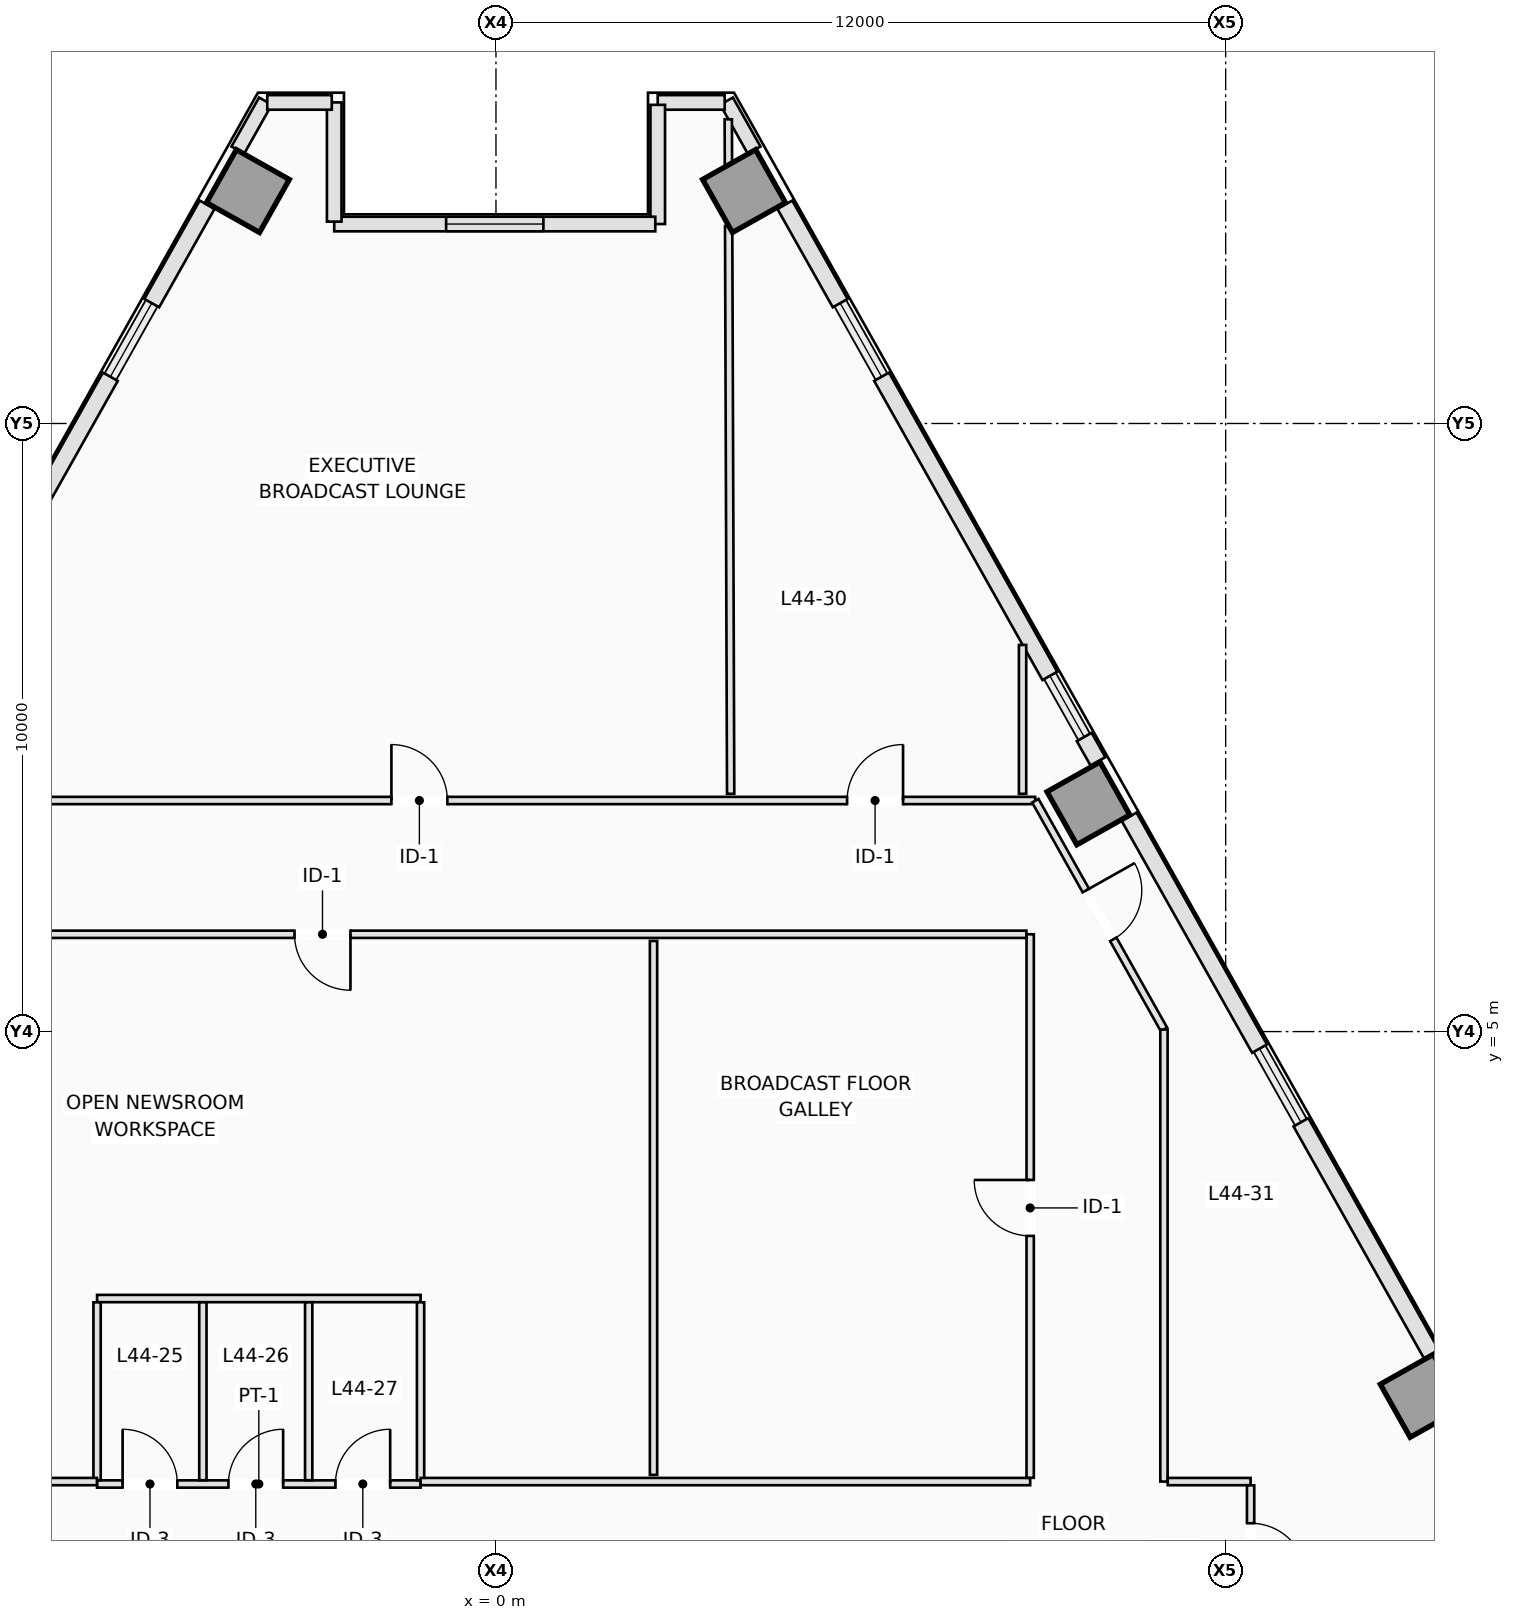
"""IFC4 building model, lengths in metres.
Left out: names, types, materials, properties, quantities, classifications, styles, units other than length and angle.
Written with IfcOpenShell. Run it as: python <this file> out.ifc"""

import sys

from ifc_helpers import new_model, si_unit, direction, frame, frame_2d, origin, origin_2d, place, context, subcontext, project, spatial, rectangle, extrude, element, fill, save


model = new_model("IFC4")
c1 = context("Model", 3, precision=1e-05, world=origin(), true_north=direction((0.0, 1.0)))
c2 = subcontext(c1, "Body", "Model", "MODEL_VIEW")
j1 = project(units=[si_unit("LENGTHUNIT", "METRE"), si_unit("PLANEANGLEUNIT", "RADIAN")], contexts=[c1])
p1 = place(None, origin())
s1 = spatial("IfcSite", under=j1, at=p1, CompositionType="ELEMENT")
p2 = place(p1, origin())
s2 = spatial("IfcBuilding", under=s1, at=p2, CompositionType="ELEMENT")
p3 = place(p2, frame((0.0, 0.0, 161.5)))
s3 = spatial("IfcBuildingStorey", under=s2, at=p3, CompositionType="ELEMENT", Elevation=161.5)
for number, where, z_axis, x_axis in (
    (1, (15.224, -0.991, 0.0), (0.0, 0.0, 1.0), (0.872, 0.49, 0.0)),
    (2, (9.743, 8.753, 0.0), (0.0, 0.0, 1.0), (0.872, 0.49, 0.0)),
    (3, (4.079, 18.822, 0.0), (0.0, 0.0, 1.0), (0.872, 0.49, 0.0)),
    (4, (-4.079, 18.822, 0.0), (0.0, 0.0, 1.0), (-0.872, 0.49, 0.0)),
):
    element("IfcColumn", number, at=place(p3, frame(where, z_axis=z_axis, x_axis=x_axis)), inside=s3, PredefinedType="COLUMN", context=c2, shape_type="SweptSolid", body=[
        extrude(rectangle(XDim=1.0, YDim=1.0, at=origin_2d()), origin(), (0.0, 0.0, 1.0), 3.5),
    ])
p4 = place(p3, frame((3.792, 20.302, 0.0), z_axis=(0.0, 0.0, 1.0), x_axis=(0.490048346303, -0.871695255399, 0.0)))
e5 = element("IfcWall", 5, at=p4, inside=s3, PredefinedType="STANDARD", context=c2, shape_type="SweptSolid", body=[
    extrude(rectangle(XDim=0.926, YDim=0.24, at=frame_2d((0.463, 0.0))), origin(), (0.0, 0.0, 1.0), 3.25),
])
p5 = place(p3, frame((4.751, 18.597, 0.0), z_axis=(0.0, 0.0, 1.0), x_axis=(0.490248749158, -0.871582562899, 0.0)))
e6 = element("IfcWall", 6, at=p5, inside=s3, PredefinedType="STANDARD", context=c2, shape_type="SweptSolid", body=[
    extrude(rectangle(XDim=1.856, YDim=0.28, at=frame_2d((0.928, 0.0))), origin(), (0.0, 0.0, 1.0), 3.25),
])
p6 = place(p3, frame((6.342, 15.768, 0.0), z_axis=(0.0, 0.0, 1.0), x_axis=(0.490289995219, -0.871559361483, 0.0)))
e7 = element("IfcWall", 7, at=p6, inside=s3, PredefinedType="STANDARD", context=c2, shape_type="SweptSolid", body=[
    extrude(rectangle(XDim=5.643, YDim=0.28, at=frame_2d((2.822, 0.0))), origin(), (0.0, 0.0, 1.0), 3.25),
])
p7 = place(p3, frame((9.674, 9.845, 0.0), z_axis=(0.0, 0.0, 1.0), x_axis=(0.490412424957, -0.871490478116, 0.0)))
e8 = element("IfcWall", 8, at=p7, inside=s3, PredefinedType="STANDARD", context=c2, shape_type="SweptSolid", body=[
    extrude(rectangle(XDim=0.46, YDim=0.28, at=frame_2d((0.23, 0.0))), origin(), (0.0, 0.0, 1.0), 3.25),
])
p8 = place(p3, frame((10.412, 8.533, 0.0), z_axis=(0.0, 0.0, 1.0), x_axis=(0.490274486291, -0.871568085747, 0.0)))
e9 = element("IfcWall", 9, at=p8, inside=s3, PredefinedType="STANDARD", context=c2, shape_type="SweptSolid", body=[
    extrude(rectangle(XDim=4.375, YDim=0.28, at=frame_2d((2.188, 0.0))), origin(), (0.0, 0.0, 1.0), 3.25),
])
p9 = place(p3, frame((13.238, 3.509, 0.0), z_axis=(0.0, 0.0, 1.0), x_axis=(0.490232095789, -0.871591929895, 0.0)))
e10 = element("IfcWall", 10, at=p9, inside=s3, PredefinedType="STANDARD", context=c2, shape_type="SweptSolid", body=[
    extrude(rectangle(XDim=4.375, YDim=0.28, at=frame_2d((2.188, 0.0))), origin(), (0.0, 0.0, 1.0), 3.25),
])
p10 = place(p3, frame((-4.246, 19.495, 0.0), z_axis=(0.0, 0.0, 1.0), x_axis=(0.490048346303, 0.871695255399, 0.0)))
e11 = element("IfcWall", 11, at=p10, inside=s3, PredefinedType="STANDARD", context=c2, shape_type="SweptSolid", body=[
    extrude(rectangle(XDim=0.926, YDim=0.24, at=frame_2d((0.463, 0.0))), origin(), (0.0, 0.0, 1.0), 3.25),
])
p11 = place(p3, frame((-9.109, 10.85, 0.0), z_axis=(0.0, 0.0, 1.0), x_axis=(0.490289995219, 0.871559361483, 0.0)))
e12 = element("IfcWall", 12, at=p11, inside=s3, PredefinedType="STANDARD", context=c2, shape_type="SweptSolid", body=[
    extrude(rectangle(XDim=5.643, YDim=0.28, at=frame_2d((2.822, 0.0))), origin(), (0.0, 0.0, 1.0), 3.25),
])
p12 = place(p3, frame((-5.661, 16.98, 0.0), z_axis=(0.0, 0.0, 1.0), x_axis=(0.490248749158, 0.871582562899, 0.0)))
e13 = element("IfcWall", 13, at=p12, inside=s3, PredefinedType="STANDARD", context=c2, shape_type="SweptSolid", body=[
    extrude(rectangle(XDim=1.856, YDim=0.28, at=frame_2d((0.928, 0.0))), origin(), (0.0, 0.0, 1.0), 3.25),
])
p13 = place(p3, frame((3.761, 20.28, 0.0), z_axis=(0.0, 0.0, 1.0), x_axis=(-1.0, 0.0, 0.0)))
e14 = element("IfcWall", 14, at=p13, inside=s3, PredefinedType="STANDARD", context=c2, shape_type="SweptSolid", body=[
    extrude(rectangle(XDim=1.102, YDim=0.24, at=frame_2d((0.551, 0.0))), origin(), (0.0, 0.0, 1.0), 3.25),
])
p14 = place(p3, frame((2.66, 20.24, 0.0), z_axis=(0.0, 0.0, 1.0), x_axis=(0.0, -1.0, 0.0)))
e15 = element("IfcWall", 15, at=p14, inside=s3, PredefinedType="STANDARD", context=c2, shape_type="SweptSolid", body=[
    extrude(rectangle(XDim=1.96, YDim=0.24, at=frame_2d((0.98, 0.0))), origin(), (0.0, 0.0, 1.0), 3.25),
])
p15 = place(p3, frame((2.62, 18.28, 0.0), z_axis=(0.0, 0.0, 1.0), x_axis=(-1.0, 0.0, 0.0)))
e16 = element("IfcWall", 16, at=p15, inside=s3, PredefinedType="STANDARD", context=c2, shape_type="SweptSolid", body=[
    extrude(rectangle(XDim=5.28, YDim=0.24, at=frame_2d((2.64, 0.0))), origin(), (0.0, 0.0, 1.0), 3.25),
])
p16 = place(p15, frame((1.84, 0.0, 0.9)))
e17 = element("IfcOpeningElement", 17, at=p16, cuts=e16, PredefinedType="OPENING", context=c2, shape_type="SweptSolid", body=[
    extrude(rectangle(XDim=1.6, YDim=2.1, at=frame_2d((0.8, 1.05))), frame((0.0, 0.13, 0.0), z_axis=(0.0, -1.0, 0.0), x_axis=(1.0, 0.0, 0.0)), (0.0, 0.0, 1.0), 0.26),
])
p17 = place(p3, frame((-2.66, 18.32, 0.0), z_axis=(0.0, 0.0, 1.0), x_axis=(0.0, 1.0, 0.0)))
e18 = element("IfcWall", 18, at=p17, inside=s3, PredefinedType="STANDARD", context=c2, shape_type="SweptSolid", body=[
    extrude(rectangle(XDim=1.96, YDim=0.24, at=frame_2d((0.98, 0.0))), origin(), (0.0, 0.0, 1.0), 3.25),
])
p18 = place(p3, frame((-2.7, 20.28, 0.0), z_axis=(0.0, 0.0, 1.0), x_axis=(-1.0, 0.0, 0.0)))
e19 = element("IfcWall", 19, at=p18, inside=s3, PredefinedType="STANDARD", context=c2, shape_type="SweptSolid", body=[
    extrude(rectangle(XDim=1.062, YDim=0.24, at=frame_2d((0.531, 0.0))), origin(), (0.0, 0.0, 1.0), 3.25),
])
p19 = place(p3, frame((-6.56, -2.44, 0.0), z_axis=(0.0, 0.0, 1.0), x_axis=(1.0, 0.0, 0.0)))
e20 = element("IfcWall", 20, at=p19, inside=s3, PredefinedType="PARTITIONING", context=c2, shape_type="SweptSolid", body=[
    extrude(rectangle(XDim=5.32, YDim=0.12, at=frame_2d((2.66, 0.0))), origin(), (0.0, 0.0, 1.0), 2.891),
])
p20 = place(p19, frame((0.42, 0.0, 0.0)))
e21 = element("IfcOpeningElement", 21, at=p20, cuts=e20, PredefinedType="OPENING", context=c2, shape_type="SweptSolid", body=[
    extrude(rectangle(XDim=0.9, YDim=2.12, at=frame_2d((0.45, 1.06))), frame((0.0, 0.07, 0.0), z_axis=(0.0, -1.0, 0.0), x_axis=(1.0, 0.0, 0.0)), (0.0, 0.0, 1.0), 0.14),
])
p21 = place(p19, frame((2.16, 0.0, 0.0)))
e22 = element("IfcOpeningElement", 22, at=p21, cuts=e20, PredefinedType="OPENING", context=c2, shape_type="SweptSolid", body=[
    extrude(rectangle(XDim=0.9, YDim=2.12, at=frame_2d((0.45, 1.06))), frame((0.0, 0.07, 0.0), z_axis=(0.0, -1.0, 0.0), x_axis=(1.0, 0.0, 0.0)), (0.0, 0.0, 1.0), 0.14),
])
p22 = place(p19, frame((3.92, 0.0, 0.0)))
e23 = element("IfcOpeningElement", 23, at=p22, cuts=e20, PredefinedType="OPENING", context=c2, shape_type="SweptSolid", body=[
    extrude(rectangle(XDim=0.9, YDim=2.12, at=frame_2d((0.45, 1.06))), frame((0.0, 0.07, 0.0), z_axis=(0.0, -1.0, 0.0), x_axis=(1.0, 0.0, 0.0)), (0.0, 0.0, 1.0), 0.14),
])
p23 = place(p3, frame((-6.56, 0.61, 0.0), z_axis=(0.0, 0.0, 1.0), x_axis=(1.0, 0.0, 0.0)))
e24 = element("IfcWall", 24, at=p23, inside=s3, PredefinedType="PARTITIONING", context=c2, shape_type="SweptSolid", body=[
    extrude(rectangle(XDim=5.32, YDim=0.12, at=frame_2d((2.66, 0.0))), origin(), (0.0, 0.0, 1.0), 3.25),
])
for number, where, z_axis, x_axis in (
    (25, (-6.56, -2.378, 0.0), (0.0, 0.0, 1.0), (0.0, 1.0, 0.0)),
    (26, (-4.82, -2.378, 0.0), (0.0, 0.0, 1.0), (0.0, 1.0, 0.0)),
    (27, (-3.08, -2.378, 0.0), (0.0, 0.0, 1.0), (0.0, 1.0, 0.0)),
    (28, (-1.24, -2.378, 0.0), (0.0, 0.0, 1.0), (0.0, 1.0, 0.0)),
):
    element("IfcWall", number, at=place(p3, frame(where, z_axis=z_axis, x_axis=x_axis)), inside=s3, PredefinedType="PARTITIONING", context=c2, shape_type="SweptSolid", body=[
        extrude(rectangle(XDim=2.926, YDim=0.12, at=frame_2d((1.463, 0.0))), origin(), (0.0, 0.0, 1.0), 3.25),
    ])
p24 = place(p3, frame((-8.864, 8.8, 0.0), z_axis=(0.0, 0.0, 1.0), x_axis=(1.0, 0.0, 0.0)))
e29 = element("IfcWall", 29, at=p24, inside=s3, PredefinedType="PARTITIONING", context=c2, shape_type="SweptSolid", body=[
    extrude(rectangle(XDim=17.731, YDim=0.12, at=frame_2d((8.866, 0.0))), origin(), (0.0, 0.0, 1.0), 3.25),
])
p25 = place(p24, frame((7.144, 0.0, 0.0)))
e30 = element("IfcOpeningElement", 30, at=p25, cuts=e29, PredefinedType="OPENING", context=c2, shape_type="SweptSolid", body=[
    extrude(rectangle(XDim=0.92, YDim=2.12, at=frame_2d((0.46, 1.06))), frame((0.0, 0.07, 0.0), z_axis=(0.0, -1.0, 0.0), x_axis=(1.0, 0.0, 0.0)), (0.0, 0.0, 1.0), 0.14),
])
p26 = place(p24, frame((14.638, 0.0, 0.0)))
e31 = element("IfcOpeningElement", 31, at=p26, cuts=e29, PredefinedType="OPENING", context=c2, shape_type="SweptSolid", body=[
    extrude(rectangle(XDim=0.92, YDim=2.12, at=frame_2d((0.46, 1.06))), frame((0.0, 0.07, 0.0), z_axis=(0.0, -1.0, 0.0), x_axis=(1.0, 0.0, 0.0)), (0.0, 0.0, 1.0), 0.14),
])
p27 = place(p3, frame((8.87, 8.796, 0.0), z_axis=(0.0, 0.0, 1.0), x_axis=(0.490296163189, -0.871555891703, 0.0)))
e32 = element("IfcWall", 32, at=p27, inside=s3, PredefinedType="PARTITIONING", context=c2, shape_type="SweptSolid", body=[
    extrude(rectangle(XDim=4.315, YDim=0.12, at=frame_2d((2.157, 0.0))), origin(), (0.0, 0.0, 1.0), 3.25),
])
p28 = place(p27, frame((1.695, 0.0, 0.0)))
e33 = element("IfcOpeningElement", 33, at=p28, cuts=e32, PredefinedType="OPENING", context=c2, shape_type="SweptSolid", body=[
    extrude(rectangle(XDim=0.92, YDim=2.12, at=frame_2d((0.46, 1.06))), frame((0.0, 0.07, 0.0), z_axis=(0.0, -1.0, 0.0), x_axis=(1.0, 0.0, 0.0)), (0.0, 0.0, 1.0), 0.14),
])
p29 = place(p3, frame((10.985, 5.034, 0.0), z_axis=(0.0, 0.0, 1.0), x_axis=(0.0, -1.0, 0.0)))
e34 = element("IfcWall", 34, at=p29, inside=s3, PredefinedType="PARTITIONING", context=c2, shape_type="SweptSolid", body=[
    extrude(rectangle(XDim=7.434, YDim=0.12, at=frame_2d((3.717, 0.0))), origin(), (0.0, 0.0, 1.0), 3.25),
])
p30 = place(p3, frame((11.047, -2.4, 0.0), z_axis=(0.0, 0.0, 1.0), x_axis=(1.0, 0.0, 0.0)))
e35 = element("IfcWall", 35, at=p30, inside=s3, PredefinedType="PARTITIONING", context=c2, shape_type="SweptSolid", body=[
    extrude(rectangle(XDim=1.363, YDim=0.12, at=frame_2d((0.681, 0.0))), origin(), (0.0, 0.0, 1.0), 3.25),
])
p31 = place(p3, frame((12.41, -2.462, 0.0), z_axis=(0.0, 0.0, 1.0), x_axis=(0.0, -1.0, 0.0)))
e36 = element("IfcWall", 36, at=p31, inside=s3, PredefinedType="PARTITIONING", context=c2, shape_type="SweptSolid", body=[
    extrude(rectangle(XDim=1.786, YDim=0.12, at=frame_2d((0.893, 0.0))), origin(), (0.0, 0.0, 1.0), 3.25),
])
p32 = place(p31, frame((0.623, 0.0, 0.0)))
e37 = element("IfcOpeningElement", 37, at=p32, cuts=e36, PredefinedType="OPENING", context=c2, shape_type="SweptSolid", body=[
    extrude(rectangle(XDim=0.92, YDim=2.12, at=frame_2d((0.46, 1.06))), frame((0.0, 0.07, 0.0), z_axis=(0.0, -1.0, 0.0), x_axis=(1.0, 0.0, 0.0)), (0.0, 0.0, 1.0), 0.14),
])
p33 = place(p3, frame((-8.515, -2.4, 0.0), z_axis=(0.0, 0.0, 1.0), x_axis=(1.0, 0.0, 0.0)))
e38 = element("IfcWall", 38, at=p33, inside=s3, PredefinedType="PARTITIONING", context=c2, shape_type="SweptSolid", body=[
    extrude(rectangle(XDim=1.953, YDim=0.12, at=frame_2d((0.977, 0.0))), origin(), (0.0, 0.0, 1.0), 3.25),
])
p34 = place(p3, frame((-1.238, -2.4, 0.0), z_axis=(0.0, 0.0, 1.0), x_axis=(1.0, 0.0, 0.0)))
e39 = element("IfcWall", 39, at=p34, inside=s3, PredefinedType="PARTITIONING", context=c2, shape_type="SweptSolid", body=[
    extrude(rectangle(XDim=10.023, YDim=0.12, at=frame_2d((5.011, 0.0))), origin(), (0.0, 0.0, 1.0), 2.891),
])
p35 = place(p3, frame((8.785, -2.338, 0.0), z_axis=(0.0, 0.0, 1.0), x_axis=(0.0, 1.0, 0.0)))
e40 = element("IfcWall", 40, at=p35, inside=s3, PredefinedType="PARTITIONING", context=c2, shape_type="SweptSolid", body=[
    extrude(rectangle(XDim=8.938, YDim=0.12, at=frame_2d((4.469, 0.0))), origin(), (0.0, 0.0, 1.0), 3.25),
])
p36 = place(p35, frame((3.978, 0.0, 0.0)))
e41 = element("IfcOpeningElement", 41, at=p36, cuts=e40, PredefinedType="OPENING", context=c2, shape_type="SweptSolid", body=[
    extrude(rectangle(XDim=0.92, YDim=2.12, at=frame_2d((0.46, 1.06))), frame((0.0, 0.07, 0.0), z_axis=(0.0, -1.0, 0.0), x_axis=(1.0, 0.0, 0.0)), (0.0, 0.0, 1.0), 0.14),
])
p37 = place(p3, frame((8.723, 6.6, 0.0), z_axis=(0.0, 0.0, 1.0), x_axis=(-1.0, 0.0, 0.0)))
e42 = element("IfcWall", 42, at=p37, inside=s3, PredefinedType="PARTITIONING", context=c2, shape_type="SweptSolid", body=[
    extrude(rectangle(XDim=17.238, YDim=0.12, at=frame_2d((8.619, 0.0))), origin(), (0.0, 0.0, 1.0), 2.891),
])
p38 = place(p37, frame((11.116, 0.0, 0.0)))
e43 = element("IfcOpeningElement", 43, at=p38, cuts=e42, PredefinedType="OPENING", context=c2, shape_type="SweptSolid", body=[
    extrude(rectangle(XDim=0.92, YDim=2.12, at=frame_2d((0.46, 1.06))), frame((0.0, 0.07, 0.0), z_axis=(0.0, -1.0, 0.0), x_axis=(1.0, 0.0, 0.0)), (0.0, 0.0, 1.0), 0.14),
])
p39 = place(p3, frame((3.82, 20.003, 0.0), z_axis=(0.0, 0.0, 1.0), x_axis=(0.00358654361, -0.999993568332, 0.0)))
e44 = element("IfcWall", 44, at=p39, inside=s3, PredefinedType="PARTITIONING", context=c2, shape_type="SweptSolid", body=[
    extrude(rectangle(XDim=0.749, YDim=0.12, at=frame_2d((0.375, 0.0))), origin(), (0.0, 0.0, 1.0), 3.25),
])
p40 = place(p3, frame((3.826, 18.248, 0.0), z_axis=(0.0, 0.0, 1.0), x_axis=(0.003529574333, -0.999993771033, 0.0)))
e45 = element("IfcWall", 45, at=p40, inside=s3, PredefinedType="PARTITIONING", context=c2, shape_type="SweptSolid", body=[
    extrude(rectangle(XDim=9.338, YDim=0.12, at=frame_2d((4.669, 0.0))), origin(), (0.0, 0.0, 1.0), 2.717),
])
p41 = place(p3, frame((8.66, 11.358, 0.0), z_axis=(0.0, 0.0, 1.0), x_axis=(0.0, -1.0, 0.0)))
e46 = element("IfcWall", 46, at=p41, inside=s3, PredefinedType="PARTITIONING", context=c2, shape_type="SweptSolid", body=[
    extrude(rectangle(XDim=2.448, YDim=0.12, at=frame_2d((1.224, 0.0))), origin(), (0.0, 0.0, 1.0), 3.25),
])
p42 = place(p3, frame((2.591, 6.49, 0.0), z_axis=(0.0, 0.0, 1.0), x_axis=(0.0, -1.0, 0.0)))
e47 = element("IfcWall", 47, at=p42, inside=s3, PredefinedType="PARTITIONING", context=c2, shape_type="SweptSolid", body=[
    extrude(rectangle(XDim=8.78, YDim=0.12, at=frame_2d((4.39, 0.0))), origin(), (0.0, 0.0, 1.0), 3.25),
])
p43 = place(p16, origin())
e48 = element("IfcWindow", 48, at=p43, inside=s3, PartitioningType="SINGLE_PANEL", PredefinedType="WINDOW", context=c2, shape_type="SweptSolid", body=[
    extrude(rectangle(XDim=1.6, YDim=2.1, at=frame_2d((0.8, 1.05))), frame((0.0, 0.03, 0.0), z_axis=(0.0, -1.0, 0.0), x_axis=(1.0, 0.0, 0.0)), (0.0, 0.0, 1.0), 0.06),
])
fill(e17, e48)
p44 = place(p20, origin())
e49 = element("IfcDoor", 49, at=p44, inside=s3, OperationType="SINGLE_SWING_LEFT", PredefinedType="DOOR", context=c2, shape_type="SweptSolid", body=[
    extrude(rectangle(XDim=0.9, YDim=2.12, at=frame_2d((0.45, 1.06))), frame((0.0, 0.025, 0.0), z_axis=(0.0, -1.0, 0.0), x_axis=(1.0, 0.0, 0.0)), (0.0, 0.0, 1.0), 0.05),
])
fill(e21, e49)
p45 = place(p21, origin())
e50 = element("IfcDoor", 50, at=p45, inside=s3, OperationType="SINGLE_SWING_RIGHT", PredefinedType="DOOR", context=c2, shape_type="SweptSolid", body=[
    extrude(rectangle(XDim=0.9, YDim=2.12, at=frame_2d((0.45, 1.06))), frame((0.0, 0.025, 0.0), z_axis=(0.0, -1.0, 0.0), x_axis=(1.0, 0.0, 0.0)), (0.0, 0.0, 1.0), 0.05),
])
fill(e22, e50)
p46 = place(p22, origin())
e51 = element("IfcDoor", 51, at=p46, inside=s3, OperationType="SINGLE_SWING_RIGHT", PredefinedType="DOOR", context=c2, shape_type="SweptSolid", body=[
    extrude(rectangle(XDim=0.9, YDim=2.12, at=frame_2d((0.45, 1.06))), frame((0.0, 0.025, 0.0), z_axis=(0.0, -1.0, 0.0), x_axis=(1.0, 0.0, 0.0)), (0.0, 0.0, 1.0), 0.05),
])
fill(e23, e51)
p47 = place(p25, origin())
e52 = element("IfcDoor", 52, at=p47, inside=s3, OperationType="SINGLE_SWING_LEFT", PredefinedType="DOOR", context=c2, shape_type="SweptSolid", body=[
    extrude(rectangle(XDim=0.92, YDim=2.12, at=frame_2d((0.46, 1.06))), frame((0.0, 0.025, 0.0), z_axis=(0.0, -1.0, 0.0), x_axis=(1.0, 0.0, 0.0)), (0.0, 0.0, 1.0), 0.05),
])
fill(e30, e52)
p48 = place(p26, origin())
e53 = element("IfcDoor", 53, at=p48, inside=s3, OperationType="SINGLE_SWING_RIGHT", PredefinedType="DOOR", context=c2, shape_type="SweptSolid", body=[
    extrude(rectangle(XDim=0.92, YDim=2.12, at=frame_2d((0.46, 1.06))), frame((0.0, 0.025, 0.0), z_axis=(0.0, -1.0, 0.0), x_axis=(1.0, 0.0, 0.0)), (0.0, 0.0, 1.0), 0.05),
])
fill(e31, e53)
p49 = place(p28, origin())
e54 = element("IfcDoor", 54, at=p49, inside=s3, OperationType="SINGLE_SWING_LEFT", PredefinedType="DOOR", context=c2, shape_type="SweptSolid", body=[
    extrude(rectangle(XDim=0.92, YDim=2.12, at=frame_2d((0.46, 1.06))), frame((0.0, 0.025, 0.0), z_axis=(0.0, -1.0, 0.0), x_axis=(1.0, 0.0, 0.0)), (0.0, 0.0, 1.0), 0.05),
])
fill(e33, e54)
p50 = place(p38, origin())
e55 = element("IfcDoor", 55, at=p50, inside=s3, OperationType="SINGLE_SWING_LEFT", PredefinedType="DOOR", context=c2, shape_type="SweptSolid", body=[
    extrude(rectangle(XDim=0.92, YDim=2.12, at=frame_2d((0.46, 1.06))), frame((0.0, 0.025, 0.0), z_axis=(0.0, -1.0, 0.0), x_axis=(1.0, 0.0, 0.0)), (0.0, 0.0, 1.0), 0.05),
])
fill(e43, e55)
p51 = place(p36, origin())
e56 = element("IfcDoor", 56, at=p51, inside=s3, OperationType="SINGLE_SWING_RIGHT", PredefinedType="DOOR", context=c2, shape_type="SweptSolid", body=[
    extrude(rectangle(XDim=0.92, YDim=2.12, at=frame_2d((0.46, 1.06))), frame((0.0, 0.025, 0.0), z_axis=(0.0, -1.0, 0.0), x_axis=(1.0, 0.0, 0.0)), (0.0, 0.0, 1.0), 0.05),
])
fill(e41, e56)
p52 = place(p32, origin())
e57 = element("IfcDoor", 57, at=p52, inside=s3, OperationType="SINGLE_SWING_RIGHT", PredefinedType="DOOR", context=c2, shape_type="SweptSolid", body=[
    extrude(rectangle(XDim=0.92, YDim=2.12, at=frame_2d((0.46, 1.06))), frame((0.0, 0.025, 0.0), z_axis=(0.0, -1.0, 0.0), x_axis=(1.0, 0.0, 0.0)), (0.0, 0.0, 1.0), 0.05),
])
fill(e37, e57)
save(model, sys.argv[1])
